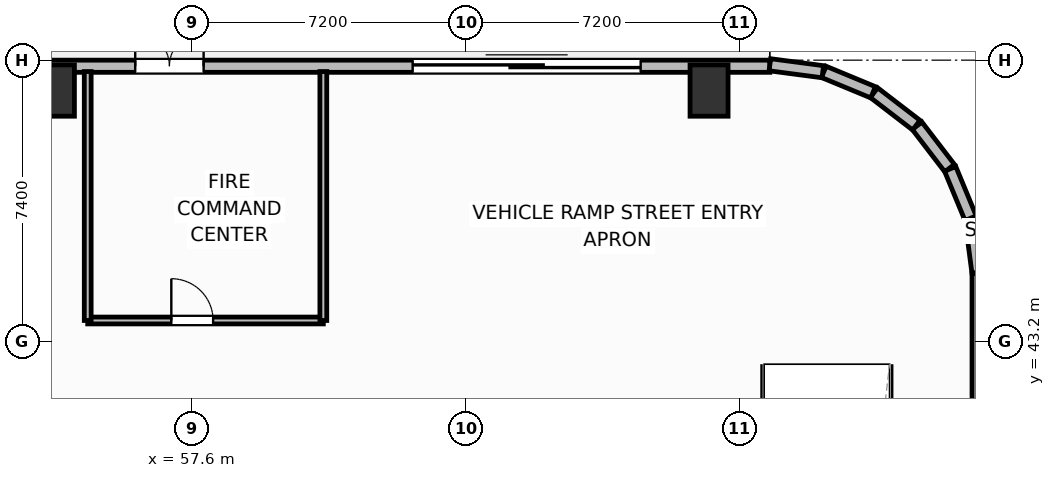
"""IFC4 building model, lengths in metres.
Left out: names, types, materials, properties, quantities, classifications, styles, units other than length and angle.
Written with IfcOpenShell. Run it as: python <this file> out.ifc"""

import sys

from ifc_helpers import new_model, si_unit, direction, frame, frame_2d, origin, origin_2d, place, context, subcontext, project, spatial, rectangle, extrude, element, fill, save


model = new_model("IFC4")
c1 = context("Model", 3, precision=1e-05, world=origin(), true_north=direction((0.0, 1.0)))
c2 = subcontext(c1, "Body", "Model", "MODEL_VIEW")
j1 = project(units=[si_unit("LENGTHUNIT", "METRE"), si_unit("PLANEANGLEUNIT", "RADIAN")], contexts=[c1])
p1 = place(None, origin())
s1 = spatial("IfcSite", under=j1, at=p1, CompositionType="ELEMENT")
p2 = place(p1, origin())
s2 = spatial("IfcBuilding", under=s1, at=p2, CompositionType="ELEMENT")
p3 = place(p2, origin())
s3 = spatial("IfcBuildingStorey", under=s2, at=p3, CompositionType="ELEMENT", Elevation=0.0)
for number, where, z_axis, x_axis in (
    (1, (54.0, 49.8, 0.0), (0.0, 0.0, 1.0), (1.0, 0.0, 0.0)),
    (2, (71.2, 49.8, 0.0), (0.0, 0.0, 1.0), (1.0, 0.0, 0.0)),
):
    element("IfcColumn", number, at=place(p3, frame(where, z_axis=z_axis, x_axis=x_axis)), inside=s3, PredefinedType="COLUMN", context=c2, shape_type="SweptSolid", body=[
        extrude(rectangle(XDim=1.0, YDim=1.35, at=origin_2d()), origin(), (0.0, 0.0, 1.0), 5.4),
    ])
p4 = place(p3, frame((5.6, 50.44, 0.0), z_axis=(0.0, 0.0, 1.0), x_axis=(1.0, 0.0, 0.0)))
e3 = element("IfcWall", 3, at=p4, inside=s3, PredefinedType="SOLIDWALL", context=c2, shape_type="SweptSolid", body=[
    extrude(rectangle(XDim=67.2, YDim=0.32, at=frame_2d((33.6, 0.0))), origin(), (0.0, 0.0, 1.0), 4.07),
])
p5 = place(p4, frame((10.05, 0.0, 0.0)))
e4 = element("IfcOpeningElement", 4, at=p5, cuts=e3, PredefinedType="OPENING", context=c2, shape_type="SweptSolid", body=[
    extrude(rectangle(XDim=1.8, YDim=2.2, at=frame_2d((0.9, 1.1))), frame((0.0, 0.17, 0.0), z_axis=(0.0, -1.0, 0.0), x_axis=(1.0, 0.0, 0.0)), (0.0, 0.0, 1.0), 0.34),
])
p6 = place(p4, frame((15.95, 0.0, 0.0)))
e5 = element("IfcOpeningElement", 5, at=p6, cuts=e3, PredefinedType="OPENING", context=c2, shape_type="SweptSolid", body=[
    extrude(rectangle(XDim=1.8, YDim=2.2, at=frame_2d((0.9, 1.1))), frame((0.0, 0.17, 0.0), z_axis=(0.0, -1.0, 0.0), x_axis=(1.0, 0.0, 0.0)), (0.0, 0.0, 1.0), 0.34),
])
p7 = place(p4, frame((43.45, 0.0, 0.0)))
e6 = element("IfcOpeningElement", 6, at=p7, cuts=e3, PredefinedType="OPENING", context=c2, shape_type="SweptSolid", body=[
    extrude(rectangle(XDim=1.8, YDim=2.2, at=frame_2d((0.9, 1.1))), frame((0.0, 0.17, 0.0), z_axis=(0.0, -1.0, 0.0), x_axis=(1.0, 0.0, 0.0)), (0.0, 0.0, 1.0), 0.34),
])
p8 = place(p4, frame((50.5, 0.0, 0.0)))
e7 = element("IfcOpeningElement", 7, at=p8, cuts=e3, PredefinedType="OPENING", context=c2, shape_type="SweptSolid", body=[
    extrude(rectangle(XDim=1.8, YDim=2.2, at=frame_2d((0.9, 1.1))), frame((0.0, 0.17, 0.0), z_axis=(0.0, -1.0, 0.0), x_axis=(1.0, 0.0, 0.0)), (0.0, 0.0, 1.0), 0.34),
])
p9 = place(p4, frame((57.8, 0.0, 0.0)))
e8 = element("IfcOpeningElement", 8, at=p9, cuts=e3, PredefinedType="OPENING", context=c2, shape_type="SweptSolid", body=[
    extrude(rectangle(XDim=6.0, YDim=3.2, at=frame_2d((3.0, 1.6))), frame((0.0, 0.17, 0.0), z_axis=(0.0, -1.0, 0.0), x_axis=(1.0, 0.0, 0.0)), (0.0, 0.0, 1.0), 0.34),
])
p10 = place(p3, frame((78.28, 35.17, 0.0), z_axis=(0.0, 0.0, 1.0), x_axis=(0.0, 1.0, 0.0)))
e9 = element("IfcWall", 9, at=p10, inside=s3, PredefinedType="SOLIDWALL", context=c2, shape_type="SweptSolid", body=[
    extrude(rectangle(XDim=9.822, YDim=0.32, at=frame_2d((4.911, 0.0))), origin(), (0.0, 0.0, 1.0), 4.07),
])
p11 = place(p3, frame((78.277, 45.017, 0.0), z_axis=(0.0, 0.0, 1.0), x_axis=(-0.130409831203, 0.991460173646, 0.0)))
e10 = element("IfcWall", 10, at=p11, inside=s3, PredefinedType="SOLIDWALL", context=c2, shape_type="SweptSolid", body=[
    extrude(rectangle(XDim=1.413, YDim=0.32, at=frame_2d((0.707, 0.0))), origin(), (0.0, 0.0, 1.0), 4.07),
])
for number, where, z_axis, x_axis in (
    (11, (78.083, 46.441, 0.0), (0.0, 0.0, 1.0), (-0.383, 0.924, 0.0)),
    (12, (77.53, 47.759, 0.0), (0.0, 0.0, 1.0), (-0.609, 0.793, 0.0)),
    (13, (76.654, 48.889, 0.0), (0.0, 0.0, 1.0), (-0.793, 0.609, 0.0)),
    (14, (75.516, 49.754, 0.0), (0.0, 0.0, 1.0), (-0.924, 0.383, 0.0)),
    (15, (74.193, 50.296, 0.0), (0.0, 0.0, 1.0), (-0.991, 0.13, 0.0)),
):
    element("IfcWall", number, at=place(p3, frame(where, z_axis=z_axis, x_axis=x_axis)), inside=s3, PredefinedType="SOLIDWALL", context=c2, shape_type="SweptSolid", body=[
        extrude(rectangle(XDim=1.405, YDim=0.32, at=frame_2d((0.703, 0.0))), origin(), (0.0, 0.0, 1.0), 4.07),
    ])
p12 = place(p3, frame((54.85, 43.75, 0.0), z_axis=(0.0, 0.0, 1.0), x_axis=(1.0, 0.0, 0.0)))
e16 = element("IfcWall", 16, at=p12, inside=s3, PredefinedType="PARTITIONING", context=c2, shape_type="SweptSolid", body=[
    extrude(rectangle(XDim=6.2, YDim=0.18, at=frame_2d((3.1, 0.0))), origin(), (0.0, 0.0, 1.0), 5.12),
])
p13 = place(p12, frame((2.2, 0.0, 0.0)))
e17 = element("IfcOpeningElement", 17, at=p13, cuts=e16, PredefinedType="OPENING", context=c2, shape_type="SweptSolid", body=[
    extrude(rectangle(XDim=1.1, YDim=2.15, at=frame_2d((0.55, 1.075))), frame((0.0, 0.1, 0.0), z_axis=(0.0, -1.0, 0.0), x_axis=(1.0, 0.0, 0.0)), (0.0, 0.0, 1.0), 0.2),
])
for number, where, z_axis, x_axis in (
    (18, (61.05, 43.75, 0.0), (0.0, 0.0, 1.0), (0.0, 1.0, 0.0)),
    (19, (54.85, 43.75, 0.0), (0.0, 0.0, 1.0), (0.0, 1.0, 0.0)),
):
    element("IfcWall", number, at=place(p3, frame(where, z_axis=z_axis, x_axis=x_axis)), inside=s3, PredefinedType="PARTITIONING", context=c2, shape_type="SweptSolid", body=[
        extrude(rectangle(XDim=6.55, YDim=0.18, at=frame_2d((3.275, 0.0))), origin(), (0.0, 0.0, 1.0), 5.12),
    ])
p14 = place(p8, origin())
e20 = element("IfcDoor", 20, at=p14, inside=s3, OperationType="DOUBLE_DOOR_SINGLE_SWING", PredefinedType="DOOR", context=c2, shape_type="SweptSolid", body=[
    extrude(rectangle(XDim=1.8, YDim=2.2, at=frame_2d((0.9, 1.1))), frame((0.0, 0.025, 0.0), z_axis=(0.0, -1.0, 0.0), x_axis=(1.0, 0.0, 0.0)), (0.0, 0.0, 1.0), 0.05),
])
fill(e7, e20)
p15 = place(p9, origin())
e21 = element("IfcDoor", 21, at=p15, inside=s3, OperationType="SLIDING_TO_LEFT", PredefinedType="GATE", context=c2, shape_type="SweptSolid", body=[
    extrude(rectangle(XDim=6.0, YDim=3.2, at=frame_2d((3.0, 1.6))), frame((0.0, 0.025, 0.0), z_axis=(0.0, -1.0, 0.0), x_axis=(1.0, 0.0, 0.0)), (0.0, 0.0, 1.0), 0.05),
])
fill(e8, e21)
p16 = place(p13, origin())
e22 = element("IfcDoor", 22, at=p16, inside=s3, OperationType="SINGLE_SWING_LEFT", PredefinedType="DOOR", context=c2, shape_type="SweptSolid", body=[
    extrude(rectangle(XDim=1.1, YDim=2.15, at=frame_2d((0.55, 1.075))), frame((0.0, 0.025, 0.0), z_axis=(0.0, -1.0, 0.0), x_axis=(1.0, 0.0, 0.0)), (0.0, 0.0, 1.0), 0.05),
])
fill(e17, e22)
save(model, sys.argv[1])
